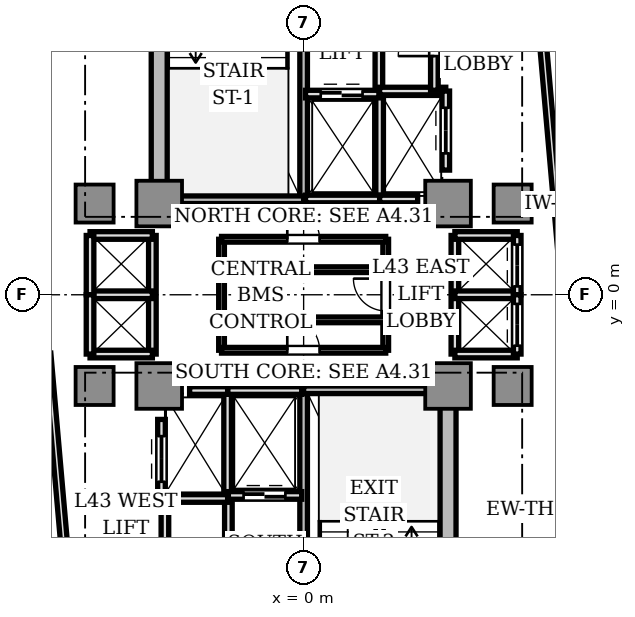
"""IFC4 building model, lengths in metres.
Left out: names, types, materials, properties, quantities, classifications, styles, units other than length and angle.
Written with IfcOpenShell. Run it as: python <this file> out.ifc"""

import sys

from ifc_helpers import new_model, si_unit, direction, frame, frame_2d, origin, origin_2d, place, context, subcontext, project, spatial, rectangle, extrude, source, transform, mapped, element, fill, save


model = new_model("IFC4")
c1 = context("Model", 3, precision=1e-05, world=origin(), true_north=direction((0.0, 1.0)))
c2 = subcontext(c1, "Body", "Model", "MODEL_VIEW")
j1 = project(units=[si_unit("LENGTHUNIT", "METRE"), si_unit("PLANEANGLEUNIT", "RADIAN")], contexts=[c1])
p1 = place(None, origin())
s1 = spatial("IfcSite", under=j1, at=p1, CompositionType="ELEMENT")
p2 = place(p1, origin())
s2 = spatial("IfcBuilding", under=s1, at=p2, CompositionType="ELEMENT")
p3 = place(p2, frame((0.0, 0.0, 157.3)))
s3 = spatial("IfcBuildingStorey", under=s2, at=p3, CompositionType="ELEMENT", Elevation=157.3)
for number, where, z_axis, x_axis in (
    (1, (-3.8, 2.85, 0.0), (0.0, 0.0, 1.0), (0.0, 1.0, 0.0)),
    (2, (3.8, -9.75, 0.0), (0.0, 0.0, 1.0), (0.0, 1.0, 0.0)),
):
    element("IfcWall", number, at=place(p3, frame(where, z_axis=z_axis, x_axis=x_axis)), inside=s3, PredefinedType="SHEAR", context=c2, shape_type="SweptSolid", body=[
        extrude(rectangle(XDim=6.9, YDim=0.42, at=frame_2d((3.45, 0.0))), origin(), (0.0, 0.0, 1.0), 3.11),
    ])
m1 = source(origin(), c2, "Body", "SweptSolid", [
    extrude(rectangle(XDim=1.2, YDim=1.2, at=origin_2d()), origin(), (0.0, 0.0, 1.0), 3.11),
])
for number, where, z_axis, x_axis in (
    (3, (-3.8, 2.4, 0.0), (0.0, 0.0, 1.0), (1.0, 0.0, 0.0)),
    (4, (3.8, 2.4, 0.0), (0.0, 0.0, 1.0), (1.0, 0.0, 0.0)),
    (5, (-3.8, -2.4, 0.0), (0.0, 0.0, 1.0), (1.0, 0.0, 0.0)),
    (6, (3.8, -2.4, 0.0), (0.0, 0.0, 1.0), (1.0, 0.0, 0.0)),
):
    element("IfcColumn", number, at=place(p3, frame(where, z_axis=z_axis, x_axis=x_axis)), inside=s3, PredefinedType="COLUMN", context=c2, shape_type="MappedRepresentation", body=[
        mapped(m1, transform((0.0, 0.0, 0.0), scale=1.0)),
    ])
m2 = source(origin(), c2, "Body", "SweptSolid", [
    extrude(rectangle(XDim=1.0, YDim=1.0, at=origin_2d()), origin(), (0.0, 0.0, 1.0), 3.11),
])
for number, where, z_axis, x_axis in (
    (7, (5.5, 2.4, 0.0), (0.0, 0.0, 1.0), (1.0, 0.0, 0.0)),
    (8, (-5.5, 2.4, 0.0), (0.0, 0.0, 1.0), (1.0, 0.0, 0.0)),
    (9, (5.5, -2.4, 0.0), (0.0, 0.0, 1.0), (1.0, 0.0, 0.0)),
    (10, (-5.5, -2.4, 0.0), (0.0, 0.0, 1.0), (1.0, 0.0, 0.0)),
):
    element("IfcColumn", number, at=place(p3, frame(where, z_axis=z_axis, x_axis=x_axis)), inside=s3, PredefinedType="COLUMN", context=c2, shape_type="MappedRepresentation", body=[
        mapped(m2, transform((0.0, 0.0, 0.0), scale=1.0)),
    ])
p4 = place(p3, frame((0.0, 2.5, 0.0), z_axis=(0.0, 0.0, 1.0), x_axis=(0.0, 1.0, 0.0)))
e11 = element("IfcWall", 11, at=p4, inside=s3, PredefinedType="SOLIDWALL", context=c2, shape_type="SweptSolid", body=[
    extrude(rectangle(XDim=7.68, YDim=0.2, at=frame_2d((3.84, 0.0))), origin(), (0.0, 0.0, 1.0), 3.11),
])
p5 = place(p4, frame((6.36, 0.0, 0.0)))
e12 = element("IfcOpeningElement", 12, at=p5, cuts=e11, PredefinedType="OPENING", context=c2, shape_type="SweptSolid", body=[
    extrude(rectangle(XDim=1.1, YDim=2.15, at=frame_2d((0.55, 1.075))), frame((0.0, 0.11, 0.0), z_axis=(0.0, -1.0, 0.0), x_axis=(1.0, 0.0, 0.0)), (0.0, 0.0, 1.0), 0.22),
])
p6 = place(p3, frame((-3.72, 2.5, 0.0), z_axis=(0.0, 0.0, 1.0), x_axis=(1.0, 0.0, 0.0)))
e13 = element("IfcWall", 13, at=p6, inside=s3, PredefinedType="SOLIDWALL", context=c2, shape_type="SweptSolid", body=[
    extrude(rectangle(XDim=3.72, YDim=0.2, at=frame_2d((1.86, 0.0))), origin(), (0.0, 0.0, 1.0), 3.11),
])
p7 = place(p3, frame((0.0, -10.18, 0.0), z_axis=(0.0, 0.0, 1.0), x_axis=(0.0, 1.0, 0.0)))
e14 = element("IfcWall", 14, at=p7, inside=s3, PredefinedType="SOLIDWALL", context=c2, shape_type="SweptSolid", body=[
    extrude(rectangle(XDim=7.68, YDim=0.2, at=frame_2d((3.84, 0.0))), origin(), (0.0, 0.0, 1.0), 3.11),
])
p8 = place(p7, frame((0.28, 0.0, 0.0)))
e15 = element("IfcOpeningElement", 15, at=p8, cuts=e14, PredefinedType="OPENING", context=c2, shape_type="SweptSolid", body=[
    extrude(rectangle(XDim=1.1, YDim=2.15, at=frame_2d((0.55, 1.075))), frame((0.0, 0.11, 0.0), z_axis=(0.0, -1.0, 0.0), x_axis=(1.0, 0.0, 0.0)), (0.0, 0.0, 1.0), 0.22),
])
p9 = place(p3, frame((0.0, -2.5, 0.0), z_axis=(0.0, 0.0, 1.0), x_axis=(1.0, 0.0, 0.0)))
e16 = element("IfcWall", 16, at=p9, inside=s3, PredefinedType="SOLIDWALL", context=c2, shape_type="SweptSolid", body=[
    extrude(rectangle(XDim=3.72, YDim=0.2, at=frame_2d((1.86, 0.0))), origin(), (0.0, 0.0, 1.0), 3.11),
])
p10 = place(p3, frame((1.98, 5.32, 0.0), z_axis=(0.0, 0.0, 1.0), x_axis=(0.0, 1.0, 0.0)))
e17 = element("IfcWall", 17, at=p10, inside=s3, PredefinedType="SOLIDWALL", context=c2, shape_type="SweptSolid", body=[
    extrude(rectangle(XDim=4.66, YDim=0.2, at=frame_2d((2.33, 0.0))), origin(), (0.0, 0.0, 1.0), 2.66),
])
p11 = place(p10, frame((3.04, 0.0, 0.0)))
e18 = element("IfcOpeningElement", 18, at=p11, cuts=e17, PredefinedType="OPENING", context=c2, shape_type="SweptSolid", body=[
    extrude(rectangle(XDim=0.85, YDim=2.1, at=frame_2d((0.425, 1.05))), frame((0.0, 0.11, 0.0), z_axis=(0.0, -1.0, 0.0), x_axis=(1.0, 0.0, 0.0)), (0.0, 0.0, 1.0), 0.22),
])
p12 = place(p3, frame((-1.98, -9.98, 0.0), z_axis=(0.0, 0.0, 1.0), x_axis=(0.0, 1.0, 0.0)))
e19 = element("IfcWall", 19, at=p12, inside=s3, PredefinedType="SOLIDWALL", context=c2, shape_type="SweptSolid", body=[
    extrude(rectangle(XDim=4.66, YDim=0.2, at=frame_2d((2.33, 0.0))), origin(), (0.0, 0.0, 1.0), 2.66),
])
p13 = place(p12, frame((0.2, 0.0, 0.0)))
e20 = element("IfcOpeningElement", 20, at=p13, cuts=e19, PredefinedType="OPENING", context=c2, shape_type="SweptSolid", body=[
    extrude(rectangle(XDim=0.85, YDim=2.1, at=frame_2d((0.425, 1.05))), frame((0.0, 0.11, 0.0), z_axis=(0.0, -1.0, 0.0), x_axis=(1.0, 0.0, 0.0)), (0.0, 0.0, 1.0), 0.22),
])
p14 = place(p3, frame((2.0, 2.5, 0.0), z_axis=(0.0, 0.0, 1.0), x_axis=(0.0, 1.0, 0.0)))
e21 = element("IfcWall", 21, at=p14, inside=s3, PredefinedType="SOLIDWALL", context=c2, shape_type="SweptSolid", body=[
    extrude(rectangle(XDim=2.78, YDim=0.2, at=frame_2d((1.39, 0.0))), origin(), (0.0, 0.0, 1.0), 2.66),
])
p15 = place(p3, frame((0.05, 2.52, 0.0), z_axis=(0.0, 0.0, 1.0), x_axis=(1.0, 0.0, 0.0)))
e22 = element("IfcWall", 22, at=p15, inside=s3, PredefinedType="SOLIDWALL", context=c2, shape_type="SweptSolid", body=[
    extrude(rectangle(XDim=1.95, YDim=0.2, at=frame_2d((0.975, 0.0))), origin(), (0.0, 0.0, 1.0), 2.66),
])
p16 = place(p3, frame((0.05, 5.28, 0.0), z_axis=(0.0, 0.0, 1.0), x_axis=(1.0, 0.0, 0.0)))
e23 = element("IfcWall", 23, at=p16, inside=s3, PredefinedType="SOLIDWALL", context=c2, shape_type="SweptSolid", body=[
    extrude(rectangle(XDim=1.93, YDim=0.2, at=frame_2d((0.965, 0.0))), origin(), (0.0, 0.0, 1.0), 2.66),
])
p17 = place(p16, frame((0.4, 0.0, 0.0)))
e24 = element("IfcOpeningElement", 24, at=p17, cuts=e23, PredefinedType="OPENING", context=c2, shape_type="SweptSolid", body=[
    extrude(rectangle(XDim=1.1, YDim=2.2, at=frame_2d((0.55, 1.1))), frame((0.0, 0.11, 0.0), z_axis=(0.0, -1.0, 0.0), x_axis=(1.0, 0.0, 0.0)), (0.0, 0.0, 1.0), 0.22),
])
p18 = place(p3, frame((-2.0, -5.28, 0.0), z_axis=(0.0, 0.0, 1.0), x_axis=(0.0, 1.0, 0.0)))
e25 = element("IfcWall", 25, at=p18, inside=s3, PredefinedType="SOLIDWALL", context=c2, shape_type="SweptSolid", body=[
    extrude(rectangle(XDim=2.78, YDim=0.2, at=frame_2d((1.39, 0.0))), origin(), (0.0, 0.0, 1.0), 2.66),
])
p19 = place(p3, frame((-2.0, -2.52, 0.0), z_axis=(0.0, 0.0, 1.0), x_axis=(1.0, 0.0, 0.0)))
e26 = element("IfcWall", 26, at=p19, inside=s3, PredefinedType="SOLIDWALL", context=c2, shape_type="SweptSolid", body=[
    extrude(rectangle(XDim=1.95, YDim=0.2, at=frame_2d((0.975, 0.0))), origin(), (0.0, 0.0, 1.0), 2.66),
])
p20 = place(p3, frame((-1.98, -5.28, 0.0), z_axis=(0.0, 0.0, 1.0), x_axis=(1.0, 0.0, 0.0)))
e27 = element("IfcWall", 27, at=p20, inside=s3, PredefinedType="SOLIDWALL", context=c2, shape_type="SweptSolid", body=[
    extrude(rectangle(XDim=1.93, YDim=0.2, at=frame_2d((0.965, 0.0))), origin(), (0.0, 0.0, 1.0), 2.66),
])
p21 = place(p20, frame((0.4, 0.0, 0.0)))
e28 = element("IfcOpeningElement", 28, at=p21, cuts=e27, PredefinedType="OPENING", context=c2, shape_type="SweptSolid", body=[
    extrude(rectangle(XDim=1.1, YDim=2.2, at=frame_2d((0.55, 1.1))), frame((0.0, 0.11, 0.0), z_axis=(0.0, -1.0, 0.0), x_axis=(1.0, 0.0, 0.0)), (0.0, 0.0, 1.0), 0.22),
])
p22 = place(p3, frame((2.0, 2.52, 0.0), z_axis=(0.0, 0.0, 1.0), x_axis=(1.0, 0.0, 0.0)))
e29 = element("IfcWall", 29, at=p22, inside=s3, PredefinedType="SOLIDWALL", context=c2, shape_type="SweptSolid", body=[
    extrude(rectangle(XDim=1.0, YDim=0.2, at=frame_2d((0.5, 0.0))), origin(), (0.0, 0.0, 1.0), 2.66),
])
p23 = place(p3, frame((2.0, 5.36, 0.0), z_axis=(0.0, 0.0, 1.0), x_axis=(1.0, 0.0, 0.0)))
e30 = element("IfcWall", 30, at=p23, inside=s3, PredefinedType="SOLIDWALL", context=c2, shape_type="SweptSolid", body=[
    extrude(rectangle(XDim=1.74, YDim=0.2, at=frame_2d((0.87, 0.0))), origin(), (0.0, 0.0, 1.0), 2.66),
])
p24 = place(p3, frame((3.74, 3.28, 0.0), z_axis=(0.0, 0.0, 1.0), x_axis=(0.0, 1.0, 0.0)))
e31 = element("IfcWall", 31, at=p24, inside=s3, PredefinedType="SOLIDWALL", context=c2, shape_type="SweptSolid", body=[
    extrude(rectangle(XDim=2.08, YDim=0.2, at=frame_2d((1.04, 0.0))), origin(), (0.0, 0.0, 1.0), 2.66),
])
p25 = place(p24, frame((0.44, 0.0, 0.0)))
e32 = element("IfcOpeningElement", 32, at=p25, cuts=e31, PredefinedType="OPENING", context=c2, shape_type="SweptSolid", body=[
    extrude(rectangle(XDim=1.2, YDim=2.2, at=frame_2d((0.6, 1.1))), frame((0.0, 0.11, 0.0), z_axis=(0.0, -1.0, 0.0), x_axis=(1.0, 0.0, 0.0)), (0.0, 0.0, 1.0), 0.22),
])
p26 = place(p3, frame((-3.0, -2.52, 0.0), z_axis=(0.0, 0.0, 1.0), x_axis=(1.0, 0.0, 0.0)))
e33 = element("IfcWall", 33, at=p26, inside=s3, PredefinedType="SOLIDWALL", context=c2, shape_type="SweptSolid", body=[
    extrude(rectangle(XDim=1.0, YDim=0.2, at=frame_2d((0.5, 0.0))), origin(), (0.0, 0.0, 1.0), 2.66),
])
p27 = place(p3, frame((-3.74, -5.36, 0.0), z_axis=(0.0, 0.0, 1.0), x_axis=(1.0, 0.0, 0.0)))
e34 = element("IfcWall", 34, at=p27, inside=s3, PredefinedType="SOLIDWALL", context=c2, shape_type="SweptSolid", body=[
    extrude(rectangle(XDim=1.74, YDim=0.2, at=frame_2d((0.87, 0.0))), origin(), (0.0, 0.0, 1.0), 2.66),
])
p28 = place(p3, frame((-3.74, -5.36, 0.0), z_axis=(0.0, 0.0, 1.0), x_axis=(0.0, 1.0, 0.0)))
e35 = element("IfcWall", 35, at=p28, inside=s3, PredefinedType="SOLIDWALL", context=c2, shape_type="SweptSolid", body=[
    extrude(rectangle(XDim=2.08, YDim=0.2, at=frame_2d((1.04, 0.0))), origin(), (0.0, 0.0, 1.0), 2.66),
])
p29 = place(p28, frame((0.44, 0.0, 0.0)))
e36 = element("IfcOpeningElement", 36, at=p29, cuts=e35, PredefinedType="OPENING", context=c2, shape_type="SweptSolid", body=[
    extrude(rectangle(XDim=1.2, YDim=2.2, at=frame_2d((0.6, 1.1))), frame((0.0, 0.11, 0.0), z_axis=(0.0, -1.0, 0.0), x_axis=(1.0, 0.0, 0.0)), (0.0, 0.0, 1.0), 0.22),
])
p30 = place(p3, frame((3.98, -1.56, 0.0), z_axis=(0.0, 0.0, 1.0), x_axis=(0.0, 1.0, 0.0)))
e37 = element("IfcWall", 37, at=p30, inside=s3, PredefinedType="SOLIDWALL", context=c2, shape_type="SweptSolid", body=[
    extrude(rectangle(XDim=3.12, YDim=0.2, at=frame_2d((1.56, 0.0))), origin(), (0.0, 0.0, 1.0), 2.28),
])
for number, where, z_axis, x_axis in (
    (38, (3.98, 1.56, 0.0), (0.0, 0.0, 1.0), (1.0, 0.0, 0.0)),
    (39, (3.98, -1.56, 0.0), (0.0, 0.0, 1.0), (1.0, 0.0, 0.0)),
    (40, (3.98, 0.0, 0.0), (0.0, 0.0, 1.0), (1.0, 0.0, 0.0)),
):
    element("IfcWall", number, at=place(p3, frame(where, z_axis=z_axis, x_axis=x_axis)), inside=s3, PredefinedType="SOLIDWALL", context=c2, shape_type="SweptSolid", body=[
        extrude(rectangle(XDim=1.64, YDim=0.2, at=frame_2d((0.82, 0.0))), origin(), (0.0, 0.0, 1.0), 2.66),
    ])
p31 = place(p3, frame((5.62, 0.0, 0.0), z_axis=(0.0, 0.0, 1.0), x_axis=(0.0, 1.0, 0.0)))
e41 = element("IfcWall", 41, at=p31, inside=s3, PredefinedType="SOLIDWALL", context=c2, shape_type="SweptSolid", body=[
    extrude(rectangle(XDim=1.56, YDim=0.2, at=frame_2d((0.78, 0.0))), origin(), (0.0, 0.0, 1.0), 2.66),
])
p32 = place(p31, frame((0.22, 0.0, 0.0)))
e42 = element("IfcOpeningElement", 42, at=p32, cuts=e41, PredefinedType="OPENING", context=c2, shape_type="SweptSolid", body=[
    extrude(rectangle(XDim=1.1, YDim=2.2, at=frame_2d((0.55, 1.1))), frame((0.0, 0.11, 0.0), z_axis=(0.0, -1.0, 0.0), x_axis=(1.0, 0.0, 0.0)), (0.0, 0.0, 1.0), 0.22),
])
p33 = place(p3, frame((5.62, -1.56, 0.0), z_axis=(0.0, 0.0, 1.0), x_axis=(0.0, 1.0, 0.0)))
e43 = element("IfcWall", 43, at=p33, inside=s3, PredefinedType="SOLIDWALL", context=c2, shape_type="SweptSolid", body=[
    extrude(rectangle(XDim=1.56, YDim=0.2, at=frame_2d((0.78, 0.0))), origin(), (0.0, 0.0, 1.0), 2.66),
])
p34 = place(p33, frame((0.22, 0.0, 0.0)))
e44 = element("IfcOpeningElement", 44, at=p34, cuts=e43, PredefinedType="OPENING", context=c2, shape_type="SweptSolid", body=[
    extrude(rectangle(XDim=1.1, YDim=2.2, at=frame_2d((0.55, 1.1))), frame((0.0, 0.11, 0.0), z_axis=(0.0, -1.0, 0.0), x_axis=(1.0, 0.0, 0.0)), (0.0, 0.0, 1.0), 0.22),
])
p35 = place(p3, frame((-3.98, -1.56, 0.0), z_axis=(0.0, 0.0, 1.0), x_axis=(0.0, 1.0, 0.0)))
e45 = element("IfcWall", 45, at=p35, inside=s3, PredefinedType="SOLIDWALL", context=c2, shape_type="SweptSolid", body=[
    extrude(rectangle(XDim=3.12, YDim=0.2, at=frame_2d((1.56, 0.0))), origin(), (0.0, 0.0, 1.0), 2.28),
])
for number, where, z_axis, x_axis in (
    (46, (-5.62, 1.56, 0.0), (0.0, 0.0, 1.0), (1.0, 0.0, 0.0)),
    (47, (-5.62, -1.56, 0.0), (0.0, 0.0, 1.0), (1.0, 0.0, 0.0)),
    (48, (-5.62, 0.0, 0.0), (0.0, 0.0, 1.0), (1.0, 0.0, 0.0)),
):
    element("IfcWall", number, at=place(p3, frame(where, z_axis=z_axis, x_axis=x_axis)), inside=s3, PredefinedType="SOLIDWALL", context=c2, shape_type="SweptSolid", body=[
        extrude(rectangle(XDim=1.64, YDim=0.2, at=frame_2d((0.82, 0.0))), origin(), (0.0, 0.0, 1.0), 2.66),
    ])
for number, where, z_axis, x_axis in (
    (49, (-5.62, 0.0, 0.0), (0.0, 0.0, 1.0), (0.0, 1.0, 0.0)),
    (50, (-5.62, -1.56, 0.0), (0.0, 0.0, 1.0), (0.0, 1.0, 0.0)),
):
    element("IfcWall", number, at=place(p3, frame(where, z_axis=z_axis, x_axis=x_axis)), inside=s3, PredefinedType="SOLIDWALL", context=c2, shape_type="SweptSolid", body=[
        extrude(rectangle(XDim=1.56, YDim=0.2, at=frame_2d((0.78, 0.0))), origin(), (0.0, 0.0, 1.0), 2.66),
    ])
p36 = place(p3, frame((3.44, 5.38, 0.0), z_axis=(0.0, 0.0, 1.0), x_axis=(0.0, 1.0, 0.0)))
e51 = element("IfcWall", 51, at=p36, inside=s3, PredefinedType="SOLIDWALL", context=c2, shape_type="SweptSolid", body=[
    extrude(rectangle(XDim=2.77, YDim=0.2, at=frame_2d((1.385, 0.0))), origin(), (0.0, 0.0, 1.0), 2.66),
])
p37 = place(p36, frame((0.9, 0.0, 0.0)))
e52 = element("IfcOpeningElement", 52, at=p37, cuts=e51, PredefinedType="OPENING", context=c2, shape_type="SweptSolid", body=[
    extrude(rectangle(XDim=0.95, YDim=2.15, at=frame_2d((0.475, 1.075))), frame((0.0, 0.11, 0.0), z_axis=(0.0, -1.0, 0.0), x_axis=(1.0, 0.0, 0.0)), (0.0, 0.0, 1.0), 0.22),
])
p38 = place(p3, frame((-3.65, -8.81, 0.0), z_axis=(0.0, 0.0, 1.0), x_axis=(0.0, 1.0, 0.0)))
e53 = element("IfcWall", 53, at=p38, inside=s3, PredefinedType="SOLIDWALL", context=c2, shape_type="SweptSolid", body=[
    extrude(rectangle(XDim=3.43, YDim=0.2, at=frame_2d((1.715, 0.0))), origin(), (0.0, 0.0, 1.0), 2.66),
])
p39 = place(p38, frame((1.2, 0.0, 0.0)))
e54 = element("IfcOpeningElement", 54, at=p39, cuts=e53, PredefinedType="OPENING", context=c2, shape_type="SweptSolid", body=[
    extrude(rectangle(XDim=0.95, YDim=2.15, at=frame_2d((0.475, 1.075))), frame((0.0, 0.11, 0.0), z_axis=(0.0, -1.0, 0.0), x_axis=(1.0, 0.0, 0.0)), (0.0, 0.0, 1.0), 0.22),
])
p40 = place(p3, frame((2.16, -1.46, 0.0), z_axis=(0.0, 0.0, 1.0), x_axis=(0.0, 1.0, 0.0)))
e55 = element("IfcWall", 55, at=p40, inside=s3, PredefinedType="PARTITIONING", context=c2, shape_type="SweptSolid", body=[
    extrude(rectangle(XDim=2.92, YDim=0.15, at=frame_2d((1.46, 0.0))), origin(), (0.0, 0.0, 1.0), 2.66),
])
p41 = place(p40, frame((1.035, 0.0, 0.0)))
e56 = element("IfcOpeningElement", 56, at=p41, cuts=e55, PredefinedType="OPENING", context=c2, shape_type="SweptSolid", body=[
    extrude(rectangle(XDim=0.85, YDim=2.1, at=frame_2d((0.425, 1.05))), frame((0.0, 0.085, 0.0), z_axis=(0.0, -1.0, 0.0), x_axis=(1.0, 0.0, 0.0)), (0.0, 0.0, 1.0), 0.17),
])
p42 = place(p3, frame((-2.16, -1.46, 0.0), z_axis=(0.0, 0.0, 1.0), x_axis=(0.0, 1.0, 0.0)))
e57 = element("IfcWall", 57, at=p42, inside=s3, PredefinedType="PARTITIONING", context=c2, shape_type="SweptSolid", body=[
    extrude(rectangle(XDim=2.92, YDim=0.15, at=frame_2d((1.46, 0.0))), origin(), (0.0, 0.0, 1.0), 2.66),
])
p43 = place(p3, frame((-2.16, 1.46, 0.0), z_axis=(0.0, 0.0, 1.0), x_axis=(1.0, 0.0, 0.0)))
e58 = element("IfcWall", 58, at=p43, inside=s3, PredefinedType="PARTITIONING", context=c2, shape_type="SweptSolid", body=[
    extrude(rectangle(XDim=4.32, YDim=0.15, at=frame_2d((2.16, 0.0))), origin(), (0.0, 0.0, 1.0), 2.66),
])
p44 = place(p43, frame((1.73, 0.0, 0.0)))
e59 = element("IfcOpeningElement", 59, at=p44, cuts=e58, PredefinedType="OPENING", context=c2, shape_type="SweptSolid", body=[
    extrude(rectangle(XDim=0.85, YDim=2.1, at=frame_2d((0.425, 1.05))), frame((0.0, 0.085, 0.0), z_axis=(0.0, -1.0, 0.0), x_axis=(1.0, 0.0, 0.0)), (0.0, 0.0, 1.0), 0.17),
])
p45 = place(p3, frame((-2.16, -1.46, 0.0), z_axis=(0.0, 0.0, 1.0), x_axis=(1.0, 0.0, 0.0)))
e60 = element("IfcWall", 60, at=p45, inside=s3, PredefinedType="PARTITIONING", context=c2, shape_type="SweptSolid", body=[
    extrude(rectangle(XDim=4.32, YDim=0.15, at=frame_2d((2.16, 0.0))), origin(), (0.0, 0.0, 1.0), 2.66),
])
p46 = place(p45, frame((1.73, 0.0, 0.0)))
e61 = element("IfcOpeningElement", 61, at=p46, cuts=e60, PredefinedType="OPENING", context=c2, shape_type="SweptSolid", body=[
    extrude(rectangle(XDim=0.85, YDim=2.1, at=frame_2d((0.425, 1.05))), frame((0.0, 0.085, 0.0), z_axis=(0.0, -1.0, 0.0), x_axis=(1.0, 0.0, 0.0)), (0.0, 0.0, 1.0), 0.17),
])
for number, where, z_axis, x_axis in (
    (62, (-2.16, 0.66, 0.0), (0.0, 0.0, 1.0), (1.0, 0.0, 0.0)),
    (63, (-2.16, -0.66, 0.0), (0.0, 0.0, 1.0), (1.0, 0.0, 0.0)),
):
    element("IfcWall", number, at=place(p3, frame(where, z_axis=z_axis, x_axis=x_axis)), inside=s3, PredefinedType="PARTITIONING", context=c2, shape_type="SweptSolid", body=[
        extrude(rectangle(XDim=4.32, YDim=0.15, at=frame_2d((2.16, 0.0))), origin(), (0.0, 0.0, 1.0), 2.66),
    ])
p47 = place(p3, frame((7.181, -3.487, 0.0), z_axis=(0.0, 0.0, 1.0), x_axis=(-0.087163455754, 0.996194023261, 0.0)))
e64 = element("IfcWall", 64, at=p47, inside=s3, PredefinedType="PARTITIONING", context=c2, shape_type="SweptSolid", body=[
    extrude(rectangle(XDim=10.4, YDim=0.18, at=frame_2d((5.2, 0.0))), origin(), (0.0, 0.0, 1.0), 2.66),
])
p48 = place(p3, frame((-6.741, -1.543, 0.0), z_axis=(0.0, 0.0, 1.0), x_axis=(0.087161289348, -0.996194212812, 0.0)))
e65 = element("IfcWall", 65, at=p48, inside=s3, PredefinedType="PARTITIONING", context=c2, shape_type="SweptSolid", body=[
    extrude(rectangle(XDim=5.35, YDim=0.18, at=frame_2d((2.675, 0.0))), origin(), (0.0, 0.0, 1.0), 2.66),
])
m3 = source(origin(), c2, "Body", "SweptSolid", [
    extrude(rectangle(XDim=1.1, YDim=0.05, at=origin_2d()), origin(), (0.0, 0.0, 1.0), 2.2),
])
p49 = place(p17, frame((0.55, 0.0, 0.0)))
e66 = element("IfcDoor", 66, at=p49, inside=s3, OperationType="DOUBLE_DOOR_SLIDING", PredefinedType="DOOR", context=c2, shape_type="MappedRepresentation", body=[
    mapped(m3, transform((0.0, 0.0, 0.0), scale=1.0)),
])
fill(e24, e66)
p50 = place(p21, frame((0.55, 0.0, 0.0)))
e67 = element("IfcDoor", 67, at=p50, inside=s3, OperationType="DOUBLE_DOOR_SLIDING", PredefinedType="DOOR", context=c2, shape_type="MappedRepresentation", body=[
    mapped(m3, transform((0.0, 0.0, 0.0), scale=1.0)),
])
fill(e28, e67)
m4 = source(origin(), c2, "Body", "SweptSolid", [
    extrude(rectangle(XDim=1.2, YDim=0.05, at=origin_2d()), origin(), (0.0, 0.0, 1.0), 2.2),
])
p51 = place(p25, frame((0.6, 0.0, 0.0)))
e68 = element("IfcDoor", 68, at=p51, inside=s3, OperationType="DOUBLE_DOOR_SLIDING", PredefinedType="DOOR", context=c2, shape_type="MappedRepresentation", body=[
    mapped(m4, transform((0.0, 0.0, 0.0), scale=1.0)),
])
fill(e32, e68)
p52 = place(p29, frame((0.6, 0.0, 0.0)))
e69 = element("IfcDoor", 69, at=p52, inside=s3, OperationType="DOUBLE_DOOR_SLIDING", PredefinedType="DOOR", context=c2, shape_type="MappedRepresentation", body=[
    mapped(m4, transform((0.0, 0.0, 0.0), scale=1.0)),
])
fill(e36, e69)
p53 = place(p32, frame((0.55, 0.0, 0.0)))
e70 = element("IfcDoor", 70, at=p53, inside=s3, OperationType="DOUBLE_DOOR_SLIDING", PredefinedType="DOOR", context=c2, shape_type="MappedRepresentation", body=[
    mapped(m3, transform((0.0, 0.0, 0.0), scale=1.0)),
])
fill(e42, e70)
p54 = place(p34, frame((0.55, 0.0, 0.0)))
e71 = element("IfcDoor", 71, at=p54, inside=s3, OperationType="DOUBLE_DOOR_SLIDING", PredefinedType="DOOR", context=c2, shape_type="MappedRepresentation", body=[
    mapped(m3, transform((0.0, 0.0, 0.0), scale=1.0)),
])
fill(e44, e71)
m5 = source(origin(), c2, "Body", "SweptSolid", [
    extrude(rectangle(XDim=0.95, YDim=0.05, at=origin_2d()), origin(), (0.0, 0.0, 1.0), 2.15),
])
p55 = place(p37, frame((0.475, 0.0, 0.0)))
e72 = element("IfcDoor", 72, at=p55, inside=s3, OperationType="SINGLE_SWING_LEFT", PredefinedType="DOOR", context=c2, shape_type="MappedRepresentation", body=[
    mapped(m5, transform((0.0, 0.0, 0.0), scale=1.0)),
])
fill(e52, e72)
m6 = source(origin(), c2, "Body", "SweptSolid", [
    extrude(rectangle(XDim=0.85, YDim=0.05, at=origin_2d()), origin(), (0.0, 0.0, 1.0), 2.1),
])
p56 = place(p44, frame((0.425, 0.0, 0.0)))
e73 = element("IfcDoor", 73, at=p56, inside=s3, OperationType="SINGLE_SWING_LEFT", PredefinedType="DOOR", context=c2, shape_type="MappedRepresentation", body=[
    mapped(m6, transform((0.0, 0.0, 0.0), scale=1.0)),
])
fill(e59, e73)
p57 = place(p41, frame((0.425, 0.0, 0.0)))
e74 = element("IfcDoor", 74, at=p57, inside=s3, OperationType="SINGLE_SWING_RIGHT", PredefinedType="DOOR", context=c2, shape_type="MappedRepresentation", body=[
    mapped(m6, transform((0.0, 0.0, 0.0), scale=1.0)),
])
fill(e56, e74)
p58 = place(p46, frame((0.425, 0.0, 0.0)))
e75 = element("IfcDoor", 75, at=p58, inside=s3, OperationType="SINGLE_SWING_LEFT", PredefinedType="DOOR", context=c2, shape_type="MappedRepresentation", body=[
    mapped(m6, transform((0.0, 0.0, 0.0), scale=1.0)),
])
fill(e61, e75)
save(model, sys.argv[1])
